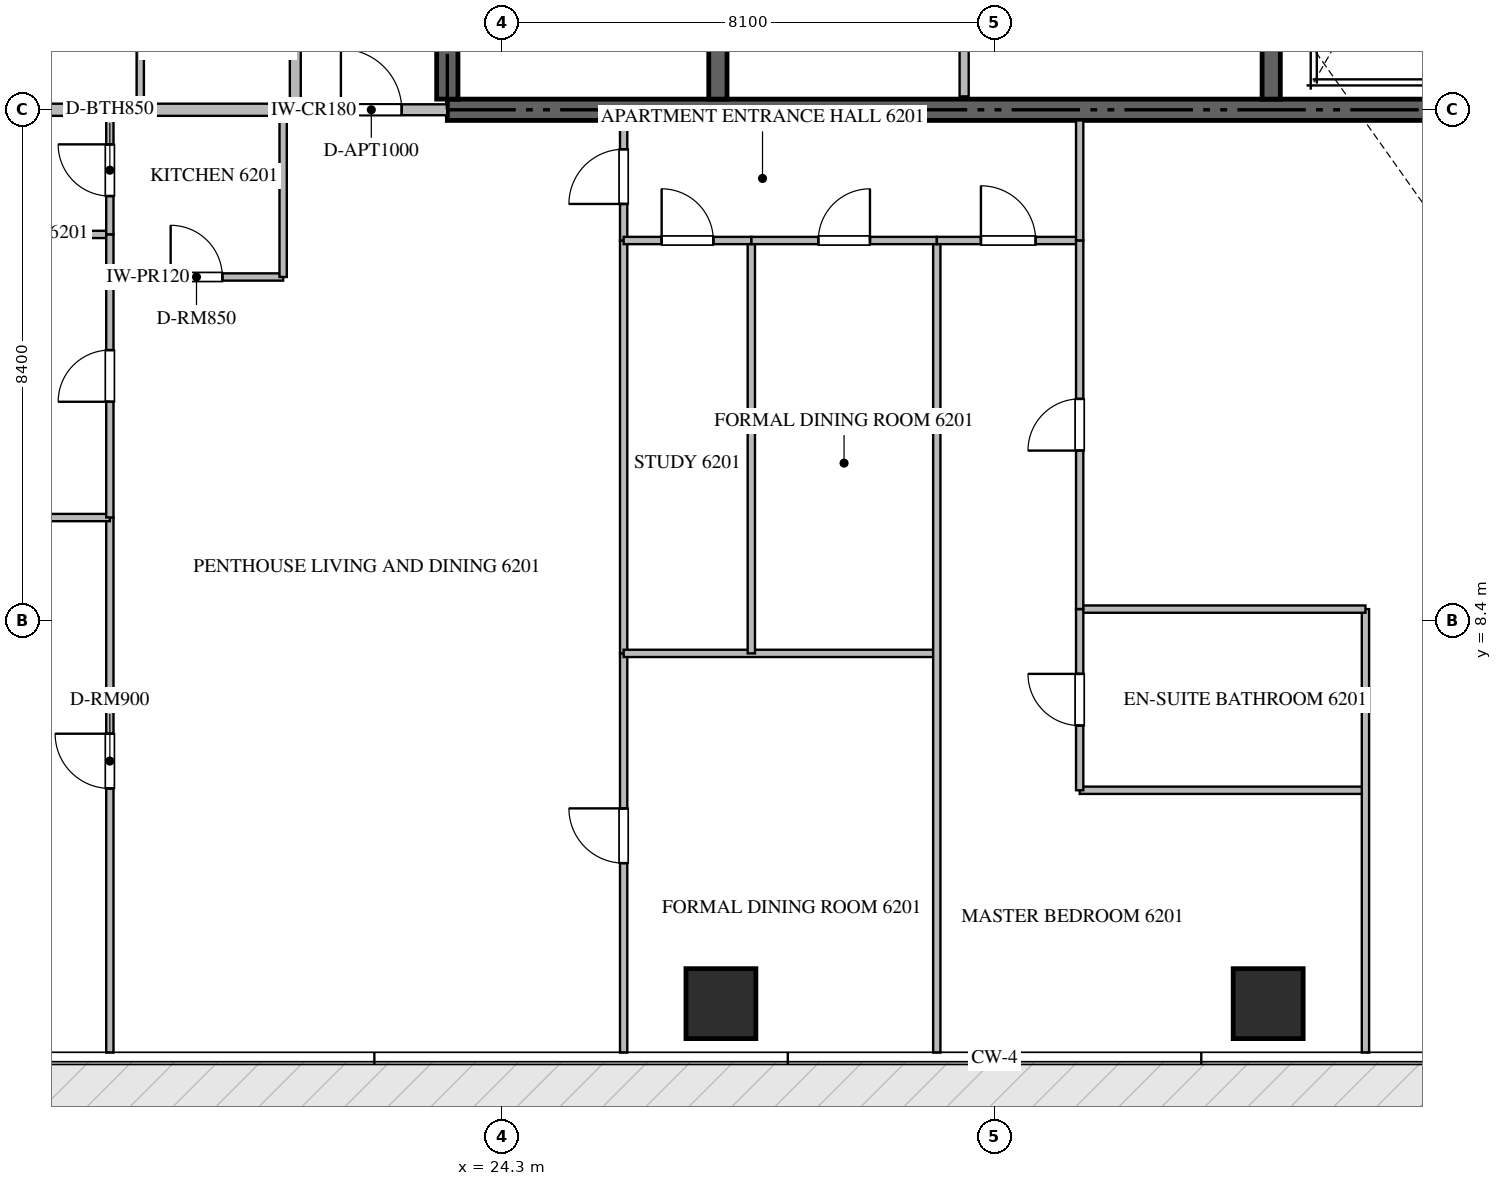
"""IFC4 building model, lengths in metres.
Left out: names, types, materials, properties, quantities, classifications, styles, units other than length and angle.
Written with IfcOpenShell. Run it as: python <this file> out.ifc"""

import sys

from ifc_helpers import new_model, si_unit, direction, frame, frame_2d, origin, origin_2d, place, context, subcontext, project, spatial, rectangle, extrude, source, transform, mapped, element, fill, save


model = new_model("IFC4")
c1 = context("Model", 3, precision=1e-05, world=origin(), true_north=direction((0.0, 1.0)))
c2 = subcontext(c1, "Body", "Model", "MODEL_VIEW")
j1 = project(units=[si_unit("LENGTHUNIT", "METRE"), si_unit("PLANEANGLEUNIT", "RADIAN")], contexts=[c1])
p1 = place(None, origin())
s1 = spatial("IfcSite", under=j1, at=p1, CompositionType="ELEMENT")
p2 = place(p1, origin())
s2 = spatial("IfcBuilding", under=s1, at=p2, CompositionType="ELEMENT")
p3 = place(p2, frame((0.0, 0.0, 248.95)))
s3 = spatial("IfcBuildingStorey", under=s2, at=p3, CompositionType="ELEMENT", Elevation=248.95)
p4 = place(p3, frame((23.4, 16.8, -0.26), z_axis=(0.0, 0.0, 1.0), x_axis=(1.0, 0.0, 0.0)))
e1 = element("IfcWall", 1, at=p4, inside=s3, PredefinedType="SHEAR", context=c2, shape_type="SweptSolid", body=[
    extrude(rectangle(XDim=18.0, YDim=0.35, at=frame_2d((9.0, 0.0))), origin(), (0.0, 0.0, 1.0), 3.848),
])
p5 = place(p3, frame((23.4, 16.975, -0.26), z_axis=(0.0, 0.0, 1.0), x_axis=(0.0, 1.0, 0.0)))
e2 = element("IfcWall", 2, at=p5, inside=s3, PredefinedType="SHEAR", context=c2, shape_type="SweptSolid", body=[
    extrude(rectangle(XDim=4.875, YDim=0.35, at=frame_2d((2.438, 0.0))), origin(), (0.0, 0.0, 1.0), 3.848),
])
p6 = place(p3, frame((27.85, 16.975, -0.26), z_axis=(0.0, 0.0, 1.0), x_axis=(0.0, 1.0, 0.0)))
e3 = element("IfcWall", 3, at=p6, inside=s3, PredefinedType="SHEAR", context=c2, shape_type="SweptSolid", body=[
    extrude(rectangle(XDim=4.875, YDim=0.3, at=frame_2d((2.438, 0.0))), origin(), (0.0, 0.0, 1.0), 3.848),
])
p7 = place(p3, frame((36.95, 16.975, -0.26), z_axis=(0.0, 0.0, 1.0), x_axis=(0.0, 1.0, 0.0)))
e4 = element("IfcWall", 4, at=p7, inside=s3, PredefinedType="SHEAR", context=c2, shape_type="SweptSolid", body=[
    extrude(rectangle(XDim=8.375, YDim=0.3, at=frame_2d((4.188, 0.0))), origin(), (0.0, 0.0, 1.0), 3.848),
])
m1 = source(origin(), c2, "Body", "SweptSolid", [
    extrude(rectangle(XDim=1.15, YDim=1.15, at=origin_2d()), origin(), (0.0, 0.0, 1.0), 3.85),
])
for number, where, z_axis, x_axis in (
    (5, (27.9, 2.1, -0.26), (0.0, 0.0, 1.0), (1.0, 0.0, 0.0)),
    (6, (36.9, 2.1, -0.26), (0.0, 0.0, 1.0), (1.0, 0.0, 0.0)),
):
    element("IfcColumn", number, at=place(p3, frame(where, z_axis=z_axis, x_axis=x_axis)), inside=s3, PredefinedType="COLUMN", context=c2, shape_type="MappedRepresentation", body=[
        mapped(m1, transform((0.0, 0.0, 0.0), scale=1.0)),
    ])
p8 = place(p3, frame((31.9, 17.02, 0.0), z_axis=(0.0, 0.0, 1.0), x_axis=(0.0, 1.0, 0.0)))
e7 = element("IfcWall", 7, at=p8, inside=s3, PredefinedType="PARTITIONING", context=c2, shape_type="SweptSolid", body=[
    extrude(rectangle(XDim=2.73, YDim=0.15, at=frame_2d((1.365, 0.0))), origin(), (0.0, 0.0, 1.0), 3.59),
])
p9 = place(p3, frame((7.482, 16.8, 0.0), z_axis=(0.0, 0.0, 1.0), x_axis=(1.0, 0.0, 0.0)))
e8 = element("IfcWall", 8, at=p9, inside=s3, PredefinedType="PARTITIONING", context=c2, shape_type="SweptSolid", body=[
    extrude(rectangle(XDim=13.418, YDim=0.2, at=frame_2d((6.709, 0.0))), origin(), (0.0, 0.0, 1.0), 3.59),
])
p10 = place(p3, frame((20.902, 16.8, 0.0), z_axis=(0.0, 0.0, 1.0), x_axis=(1.0, 0.0, 0.0)))
e9 = element("IfcWall", 9, at=p10, inside=s3, PredefinedType="PARTITIONING", context=c2, shape_type="SweptSolid", body=[
    extrude(rectangle(XDim=2.496, YDim=0.18, at=frame_2d((1.248, 0.0))), origin(), (0.0, 0.0, 1.0), 3.59),
])
p11 = place(p10, frame((0.748, 0.0, 0.0)))
e10 = element("IfcOpeningElement", 10, at=p11, cuts=e9, PredefinedType="OPENING", context=c2, shape_type="SweptSolid", body=[
    extrude(rectangle(XDim=1.0, YDim=2.15, at=frame_2d((0.5, 1.075))), frame((0.0, 0.1, 0.0), z_axis=(0.0, -1.0, 0.0), x_axis=(1.0, 0.0, 0.0)), (0.0, 0.0, 1.0), 0.2),
])
p12 = place(p3, frame((20.9, 16.8, 0.0), z_axis=(0.0, 0.0, 1.0), x_axis=(0.0, 1.0, 0.0)))
e11 = element("IfcWall", 11, at=p12, inside=s3, PredefinedType="PARTITIONING", context=c2, shape_type="SweptSolid", body=[
    extrude(rectangle(XDim=16.8, YDim=0.18, at=frame_2d((8.4, 0.0))), origin(), (0.0, 0.0, 1.0), 3.59),
])
p13 = place(p12, frame((4.803, 0.0, 0.0)))
e12 = element("IfcOpeningElement", 12, at=p13, cuts=e11, PredefinedType="OPENING", context=c2, shape_type="SweptSolid", body=[
    extrude(rectangle(XDim=1.0, YDim=2.15, at=frame_2d((0.5, 1.075))), frame((0.0, 0.1, 0.0), z_axis=(0.0, -1.0, 0.0), x_axis=(1.0, 0.0, 0.0)), (0.0, 0.0, 1.0), 0.2),
])
p14 = place(p12, frame((13.225, 0.0, 0.0)))
e13 = element("IfcOpeningElement", 13, at=p14, cuts=e11, PredefinedType="OPENING", context=c2, shape_type="SweptSolid", body=[
    extrude(rectangle(XDim=1.0, YDim=2.15, at=frame_2d((0.5, 1.075))), frame((0.0, 0.1, 0.0), z_axis=(0.0, -1.0, 0.0), x_axis=(1.0, 0.0, 0.0)), (0.0, 0.0, 1.0), 0.2),
])
p15 = place(p3, frame((17.85, 14.05, 0.0), z_axis=(0.0, 0.0, 1.0), x_axis=(1.0, 0.0, 0.0)))
e14 = element("IfcWall", 14, at=p15, inside=s3, PredefinedType="PARTITIONING", context=c2, shape_type="SweptSolid", body=[
    extrude(rectangle(XDim=2.85, YDim=0.12, at=frame_2d((1.425, 0.0))), origin(), (0.0, 0.0, 1.0), 3.59),
])
p16 = place(p15, frame((1.0, 0.0, 0.0)))
e15 = element("IfcOpeningElement", 15, at=p16, cuts=e14, PredefinedType="OPENING", context=c2, shape_type="SweptSolid", body=[
    extrude(rectangle(XDim=0.85, YDim=2.1, at=frame_2d((0.425, 1.05))), frame((0.0, 0.07, 0.0), z_axis=(0.0, -1.0, 0.0), x_axis=(1.0, 0.0, 0.0)), (0.0, 0.0, 1.0), 0.14),
])
p17 = place(p3, frame((20.7, 14.05, 0.0), z_axis=(0.0, 0.0, 1.0), x_axis=(0.0, 1.0, 0.0)))
e16 = element("IfcWall", 16, at=p17, inside=s3, PredefinedType="PARTITIONING", context=c2, shape_type="SweptSolid", body=[
    extrude(rectangle(XDim=2.81, YDim=0.12, at=frame_2d((1.405, 0.0))), origin(), (0.0, 0.0, 1.0), 3.59),
])
p18 = place(p3, frame((17.85, 1.295, 0.0), z_axis=(0.0, 0.0, 1.0), x_axis=(0.0, 1.0, 0.0)))
e17 = element("IfcWall", 17, at=p18, inside=s3, PredefinedType="PARTITIONING", context=c2, shape_type="SweptSolid", body=[
    extrude(rectangle(XDim=8.799, YDim=0.12, at=frame_2d((4.399, 0.0))), origin(), (0.0, 0.0, 1.0), 3.59),
])
p19 = place(p18, frame((4.344, 0.0, 0.0)))
e18 = element("IfcOpeningElement", 18, at=p19, cuts=e17, PredefinedType="OPENING", context=c2, shape_type="SweptSolid", body=[
    extrude(rectangle(XDim=0.9, YDim=2.1, at=frame_2d((0.45, 1.05))), frame((0.0, 0.07, 0.0), z_axis=(0.0, -1.0, 0.0), x_axis=(1.0, 0.0, 0.0)), (0.0, 0.0, 1.0), 0.14),
])
p20 = place(p3, frame((7.495, 10.094, 0.0), z_axis=(0.0, 0.0, 1.0), x_axis=(1.0, 0.0, 0.0)))
e19 = element("IfcWall", 19, at=p20, inside=s3, PredefinedType="PARTITIONING", context=c2, shape_type="SweptSolid", body=[
    extrude(rectangle(XDim=10.355, YDim=0.12, at=frame_2d((5.177, 0.0))), origin(), (0.0, 0.0, 1.0), 3.122),
])
p21 = place(p3, frame((14.65, 14.75, 0.0), z_axis=(0.0, 0.0, 1.0), x_axis=(1.0, 0.0, 0.0)))
e20 = element("IfcWall", 20, at=p21, inside=s3, PredefinedType="PARTITIONING", context=c2, shape_type="SweptSolid", body=[
    extrude(rectangle(XDim=3.2, YDim=0.12, at=frame_2d((1.6, 0.0))), origin(), (0.0, 0.0, 1.0), 3.59),
])
p22 = place(p3, frame((17.85, 10.096, 0.0), z_axis=(0.0, 0.0, 1.0), x_axis=(0.0, 1.0, 0.0)))
e21 = element("IfcWall", 21, at=p22, inside=s3, PredefinedType="PARTITIONING", context=c2, shape_type="SweptSolid", body=[
    extrude(rectangle(XDim=4.654, YDim=0.12, at=frame_2d((2.327, 0.0))), origin(), (0.0, 0.0, 1.0), 3.59),
])
p23 = place(p22, frame((1.902, 0.0, 0.0)))
e22 = element("IfcOpeningElement", 22, at=p23, cuts=e21, PredefinedType="OPENING", context=c2, shape_type="SweptSolid", body=[
    extrude(rectangle(XDim=0.85, YDim=2.1, at=frame_2d((0.425, 1.05))), frame((0.0, 0.07, 0.0), z_axis=(0.0, -1.0, 0.0), x_axis=(1.0, 0.0, 0.0)), (0.0, 0.0, 1.0), 0.14),
])
p24 = place(p3, frame((17.85, 14.752, 0.0), z_axis=(0.0, 0.0, 1.0), x_axis=(0.0, 1.0, 0.0)))
e23 = element("IfcWall", 23, at=p24, inside=s3, PredefinedType="PARTITIONING", context=c2, shape_type="SweptSolid", body=[
    extrude(rectangle(XDim=2.108, YDim=0.12, at=frame_2d((1.054, 0.0))), origin(), (0.0, 0.0, 1.0), 3.59),
])
p25 = place(p24, frame((0.629, 0.0, 0.0)))
e24 = element("IfcOpeningElement", 24, at=p25, cuts=e23, PredefinedType="OPENING", context=c2, shape_type="SweptSolid", body=[
    extrude(rectangle(XDim=0.85, YDim=2.1, at=frame_2d((0.425, 1.05))), frame((0.0, 0.07, 0.0), z_axis=(0.0, -1.0, 0.0), x_axis=(1.0, 0.0, 0.0)), (0.0, 0.0, 1.0), 0.14),
])
p26 = place(p3, frame((26.3, 14.65, 0.0), z_axis=(0.0, 0.0, 1.0), x_axis=(0.0, 1.0, 0.0)))
e25 = element("IfcWall", 25, at=p26, inside=s3, PredefinedType="PARTITIONING", context=c2, shape_type="SweptSolid", body=[
    extrude(rectangle(XDim=1.975, YDim=0.12, at=frame_2d((0.988, 0.0))), origin(), (0.0, 0.0, 1.0), 3.59),
])
p27 = place(p26, frame((0.601, 0.0, 0.0)))
e26 = element("IfcOpeningElement", 26, at=p27, cuts=e25, PredefinedType="OPENING", context=c2, shape_type="SweptSolid", body=[
    extrude(rectangle(XDim=0.9, YDim=2.1, at=frame_2d((0.45, 1.05))), frame((0.0, 0.07, 0.0), z_axis=(0.0, -1.0, 0.0), x_axis=(1.0, 0.0, 0.0)), (0.0, 0.0, 1.0), 0.14),
])
p28 = place(p3, frame((26.3, 1.295, 0.0), z_axis=(0.0, 0.0, 1.0), x_axis=(0.0, 1.0, 0.0)))
e27 = element("IfcWall", 27, at=p28, inside=s3, PredefinedType="PARTITIONING", context=c2, shape_type="SweptSolid", body=[
    extrude(rectangle(XDim=6.565, YDim=0.12, at=frame_2d((3.283, 0.0))), origin(), (0.0, 0.0, 1.0), 3.59),
])
p29 = place(p28, frame((3.116, 0.0, 0.0)))
e28 = element("IfcOpeningElement", 28, at=p29, cuts=e27, PredefinedType="OPENING", context=c2, shape_type="SweptSolid", body=[
    extrude(rectangle(XDim=0.9, YDim=2.1, at=frame_2d((0.45, 1.05))), frame((0.0, 0.07, 0.0), z_axis=(0.0, -1.0, 0.0), x_axis=(1.0, 0.0, 0.0)), (0.0, 0.0, 1.0), 0.14),
])
p30 = place(p3, frame((26.3, 7.862, 0.0), z_axis=(0.0, 0.0, 1.0), x_axis=(0.0, 1.0, 0.0)))
e29 = element("IfcWall", 29, at=p30, inside=s3, PredefinedType="PARTITIONING", context=c2, shape_type="SweptSolid", body=[
    extrude(rectangle(XDim=6.786, YDim=0.12, at=frame_2d((3.393, 0.0))), origin(), (0.0, 0.0, 1.0), 3.59),
])
p31 = place(p3, frame((26.3, 7.86, 0.0), z_axis=(0.0, 0.0, 1.0), x_axis=(1.0, 0.0, 0.0)))
e30 = element("IfcWall", 30, at=p31, inside=s3, PredefinedType="PARTITIONING", context=c2, shape_type="SweptSolid", body=[
    extrude(rectangle(XDim=5.15, YDim=0.12, at=frame_2d((2.575, 0.0))), origin(), (0.0, 0.0, 1.0), 3.59),
])
p32 = place(p3, frame((31.45, 1.295, 0.0), z_axis=(0.0, 0.0, 1.0), x_axis=(0.0, 1.0, 0.0)))
e31 = element("IfcWall", 31, at=p32, inside=s3, PredefinedType="PARTITIONING", context=c2, shape_type="SweptSolid", body=[
    extrude(rectangle(XDim=13.355, YDim=0.12, at=frame_2d((6.677, 0.0))), origin(), (0.0, 0.0, 1.0), 3.59),
])
p33 = place(p3, frame((28.4, 7.86, 0.0), z_axis=(0.0, 0.0, 1.0), x_axis=(0.0, 1.0, 0.0)))
e32 = element("IfcWall", 32, at=p33, inside=s3, PredefinedType="PARTITIONING", context=c2, shape_type="SweptSolid", body=[
    extrude(rectangle(XDim=6.79, YDim=0.12, at=frame_2d((3.395, 0.0))), origin(), (0.0, 0.0, 1.0), 3.59),
])
p34 = place(p3, frame((26.3, 14.65, 0.0), z_axis=(0.0, 0.0, 1.0), x_axis=(1.0, 0.0, 0.0)))
e33 = element("IfcWall", 33, at=p34, inside=s3, PredefinedType="PARTITIONING", context=c2, shape_type="SweptSolid", body=[
    extrude(rectangle(XDim=2.1, YDim=0.12, at=frame_2d((1.05, 0.0))), origin(), (0.0, 0.0, 1.0), 3.59),
])
p35 = place(p34, frame((0.625, 0.0, 0.0)))
e34 = element("IfcOpeningElement", 34, at=p35, cuts=e33, PredefinedType="OPENING", context=c2, shape_type="SweptSolid", body=[
    extrude(rectangle(XDim=0.85, YDim=2.1, at=frame_2d((0.425, 1.05))), frame((0.0, 0.07, 0.0), z_axis=(0.0, -1.0, 0.0), x_axis=(1.0, 0.0, 0.0)), (0.0, 0.0, 1.0), 0.14),
])
p36 = place(p3, frame((28.402, 14.65, 0.0), z_axis=(0.0, 0.0, 1.0), x_axis=(1.0, 0.0, 0.0)))
e35 = element("IfcWall", 35, at=p36, inside=s3, PredefinedType="PARTITIONING", context=c2, shape_type="SweptSolid", body=[
    extrude(rectangle(XDim=3.048, YDim=0.12, at=frame_2d((1.524, 0.0))), origin(), (0.0, 0.0, 1.0), 3.59),
])
p37 = place(p36, frame((1.099, 0.0, 0.0)))
e36 = element("IfcOpeningElement", 36, at=p37, cuts=e35, PredefinedType="OPENING", context=c2, shape_type="SweptSolid", body=[
    extrude(rectangle(XDim=0.85, YDim=2.1, at=frame_2d((0.425, 1.05))), frame((0.0, 0.07, 0.0), z_axis=(0.0, -1.0, 0.0), x_axis=(1.0, 0.0, 0.0)), (0.0, 0.0, 1.0), 0.14),
])
p38 = place(p3, frame((31.452, 14.65, 0.0), z_axis=(0.0, 0.0, 1.0), x_axis=(1.0, 0.0, 0.0)))
e37 = element("IfcWall", 37, at=p38, inside=s3, PredefinedType="PARTITIONING", context=c2, shape_type="SweptSolid", body=[
    extrude(rectangle(XDim=2.348, YDim=0.12, at=frame_2d((1.174, 0.0))), origin(), (0.0, 0.0, 1.0), 3.59),
])
p39 = place(p38, frame((0.724, 0.0, 0.0)))
e38 = element("IfcOpeningElement", 38, at=p39, cuts=e37, PredefinedType="OPENING", context=c2, shape_type="SweptSolid", body=[
    extrude(rectangle(XDim=0.9, YDim=2.1, at=frame_2d((0.45, 1.05))), frame((0.0, 0.07, 0.0), z_axis=(0.0, -1.0, 0.0), x_axis=(1.0, 0.0, 0.0)), (0.0, 0.0, 1.0), 0.14),
])
p40 = place(p3, frame((33.8, 5.609, 0.0), z_axis=(0.0, 0.0, 1.0), x_axis=(1.0, 0.0, 0.0)))
e39 = element("IfcWall", 39, at=p40, inside=s3, PredefinedType="PARTITIONING", context=c2, shape_type="SweptSolid", body=[
    extrude(rectangle(XDim=4.7, YDim=0.12, at=frame_2d((2.35, 0.0))), origin(), (0.0, 0.0, 1.0), 3.59),
])
p41 = place(p3, frame((38.5, 1.295, 0.0), z_axis=(0.0, 0.0, 1.0), x_axis=(0.0, 1.0, 0.0)))
e40 = element("IfcWall", 40, at=p41, inside=s3, PredefinedType="PARTITIONING", context=c2, shape_type="SweptSolid", body=[
    extrude(rectangle(XDim=7.293, YDim=0.12, at=frame_2d((3.646, 0.0))), origin(), (0.0, 0.0, 1.0), 3.59),
])
p42 = place(p3, frame((33.8, 8.588, 0.0), z_axis=(0.0, 0.0, 1.0), x_axis=(1.0, 0.0, 0.0)))
e41 = element("IfcWall", 41, at=p42, inside=s3, PredefinedType="PARTITIONING", context=c2, shape_type="SweptSolid", body=[
    extrude(rectangle(XDim=4.7, YDim=0.12, at=frame_2d((2.35, 0.0))), origin(), (0.0, 0.0, 1.0), 3.59),
])
p43 = place(p3, frame((33.8, 5.609, 0.0), z_axis=(0.0, 0.0, 1.0), x_axis=(0.0, 1.0, 0.0)))
e42 = element("IfcWall", 42, at=p43, inside=s3, PredefinedType="PARTITIONING", context=c2, shape_type="SweptSolid", body=[
    extrude(rectangle(XDim=2.979, YDim=0.12, at=frame_2d((1.49, 0.0))), origin(), (0.0, 0.0, 1.0), 3.59),
])
p44 = place(p43, frame((1.064, 0.0, 0.0)))
e43 = element("IfcOpeningElement", 43, at=p44, cuts=e42, PredefinedType="OPENING", context=c2, shape_type="SweptSolid", body=[
    extrude(rectangle(XDim=0.85, YDim=2.1, at=frame_2d((0.425, 1.05))), frame((0.0, 0.07, 0.0), z_axis=(0.0, -1.0, 0.0), x_axis=(1.0, 0.0, 0.0)), (0.0, 0.0, 1.0), 0.14),
])
p45 = place(p3, frame((33.8, 8.59, 0.0), z_axis=(0.0, 0.0, 1.0), x_axis=(0.0, 1.0, 0.0)))
e44 = element("IfcWall", 44, at=p45, inside=s3, PredefinedType="PARTITIONING", context=c2, shape_type="SweptSolid", body=[
    extrude(rectangle(XDim=6.06, YDim=0.12, at=frame_2d((3.03, 0.0))), origin(), (0.0, 0.0, 1.0), 3.59),
])
p46 = place(p45, frame((2.605, 0.0, 0.0)))
e45 = element("IfcOpeningElement", 45, at=p46, cuts=e44, PredefinedType="OPENING", context=c2, shape_type="SweptSolid", body=[
    extrude(rectangle(XDim=0.85, YDim=2.1, at=frame_2d((0.425, 1.05))), frame((0.0, 0.07, 0.0), z_axis=(0.0, -1.0, 0.0), x_axis=(1.0, 0.0, 0.0)), (0.0, 0.0, 1.0), 0.14),
])
p47 = place(p3, frame((33.8, 14.652, 0.0), z_axis=(0.0, 0.0, 1.0), x_axis=(0.0, 1.0, 0.0)))
e46 = element("IfcWall", 46, at=p47, inside=s3, PredefinedType="PARTITIONING", context=c2, shape_type="SweptSolid", body=[
    extrude(rectangle(XDim=1.973, YDim=0.12, at=frame_2d((0.986, 0.0))), origin(), (0.0, 0.0, 1.0), 3.59),
])
p48 = place(p3, frame((18.35, 16.74, 0.0), z_axis=(0.0, 0.0, 1.0), x_axis=(0.0, 1.0, 0.0)))
e47 = element("IfcWall", 47, at=p48, inside=s3, PredefinedType="PARTITIONING", context=c2, shape_type="SweptSolid", body=[
    extrude(rectangle(XDim=2.66, YDim=0.12, at=frame_2d((1.33, 0.0))), origin(), (0.0, 0.0, 1.0), 3.59),
])
m2 = source(origin(), c2, "Body", "SweptSolid", [
    extrude(rectangle(XDim=1.0, YDim=2.15, at=frame_2d((0.5, 1.075))), frame((0.0, 0.025, 0.0), z_axis=(0.0, -1.0, 0.0), x_axis=(1.0, 0.0, 0.0)), (0.0, 0.0, 1.0), 0.05),
])
p49 = place(p11, origin())
e48 = element("IfcDoor", 48, at=p49, inside=s3, OperationType="SINGLE_SWING_LEFT", PredefinedType="DOOR", context=c2, shape_type="MappedRepresentation", body=[
    mapped(m2, transform((0.0, 0.0, 0.0), scale=1.0)),
])
fill(e10, e48)
m3 = source(origin(), c2, "Body", "SweptSolid", [
    extrude(rectangle(XDim=0.85, YDim=2.1, at=frame_2d((0.425, 1.05))), frame((0.0, 0.025, 0.0), z_axis=(0.0, -1.0, 0.0), x_axis=(1.0, 0.0, 0.0)), (0.0, 0.0, 1.0), 0.05),
])
p50 = place(p16, origin())
e49 = element("IfcDoor", 49, at=p50, inside=s3, OperationType="SINGLE_SWING_LEFT", PredefinedType="DOOR", context=c2, shape_type="MappedRepresentation", body=[
    mapped(m3, transform((0.0, 0.0, 0.0), scale=1.0)),
])
fill(e15, e49)
m4 = source(origin(), c2, "Body", "SweptSolid", [
    extrude(rectangle(XDim=0.9, YDim=2.1, at=frame_2d((0.45, 1.05))), frame((0.0, 0.025, 0.0), z_axis=(0.0, -1.0, 0.0), x_axis=(1.0, 0.0, 0.0)), (0.0, 0.0, 1.0), 0.05),
])
p51 = place(p19, origin())
e50 = element("IfcDoor", 50, at=p51, inside=s3, OperationType="SINGLE_SWING_RIGHT", PredefinedType="DOOR", context=c2, shape_type="MappedRepresentation", body=[
    mapped(m4, transform((0.0, 0.0, 0.0), scale=1.0)),
])
fill(e18, e50)
p52 = place(p23, origin())
e51 = element("IfcDoor", 51, at=p52, inside=s3, OperationType="SINGLE_SWING_LEFT", PredefinedType="DOOR", context=c2, shape_type="MappedRepresentation", body=[
    mapped(m3, transform((0.0, 0.0, 0.0), scale=1.0)),
])
fill(e22, e51)
p53 = place(p25, origin())
e52 = element("IfcDoor", 52, at=p53, inside=s3, OperationType="SINGLE_SWING_RIGHT", PredefinedType="DOOR", context=c2, shape_type="MappedRepresentation", body=[
    mapped(m3, transform((0.0, 0.0, 0.0), scale=1.0)),
])
fill(e24, e52)
p54 = place(p27, origin())
e53 = element("IfcDoor", 53, at=p54, inside=s3, OperationType="SINGLE_SWING_LEFT", PredefinedType="DOOR", context=c2, shape_type="MappedRepresentation", body=[
    mapped(m4, transform((0.0, 0.0, 0.0), scale=1.0)),
])
fill(e26, e53)
p55 = place(p29, origin())
e54 = element("IfcDoor", 54, at=p55, inside=s3, OperationType="SINGLE_SWING_RIGHT", PredefinedType="DOOR", context=c2, shape_type="MappedRepresentation", body=[
    mapped(m4, transform((0.0, 0.0, 0.0), scale=1.0)),
])
fill(e28, e54)
p56 = place(p35, origin())
e55 = element("IfcDoor", 55, at=p56, inside=s3, OperationType="SINGLE_SWING_LEFT", PredefinedType="DOOR", context=c2, shape_type="MappedRepresentation", body=[
    mapped(m3, transform((0.0, 0.0, 0.0), scale=1.0)),
])
fill(e34, e55)
p57 = place(p37, origin())
e56 = element("IfcDoor", 56, at=p57, inside=s3, OperationType="SINGLE_SWING_RIGHT", PredefinedType="DOOR", context=c2, shape_type="MappedRepresentation", body=[
    mapped(m3, transform((0.0, 0.0, 0.0), scale=1.0)),
])
fill(e36, e56)
p58 = place(p39, origin())
e57 = element("IfcDoor", 57, at=p58, inside=s3, OperationType="SINGLE_SWING_LEFT", PredefinedType="DOOR", context=c2, shape_type="MappedRepresentation", body=[
    mapped(m4, transform((0.0, 0.0, 0.0), scale=1.0)),
])
fill(e38, e57)
p59 = place(p44, origin())
e58 = element("IfcDoor", 58, at=p59, inside=s3, OperationType="SINGLE_SWING_RIGHT", PredefinedType="DOOR", context=c2, shape_type="MappedRepresentation", body=[
    mapped(m3, transform((0.0, 0.0, 0.0), scale=1.0)),
])
fill(e43, e58)
p60 = place(p46, origin())
e59 = element("IfcDoor", 59, at=p60, inside=s3, OperationType="SINGLE_SWING_LEFT", PredefinedType="DOOR", context=c2, shape_type="MappedRepresentation", body=[
    mapped(m3, transform((0.0, 0.0, 0.0), scale=1.0)),
])
fill(e45, e59)
save(model, sys.argv[1])
